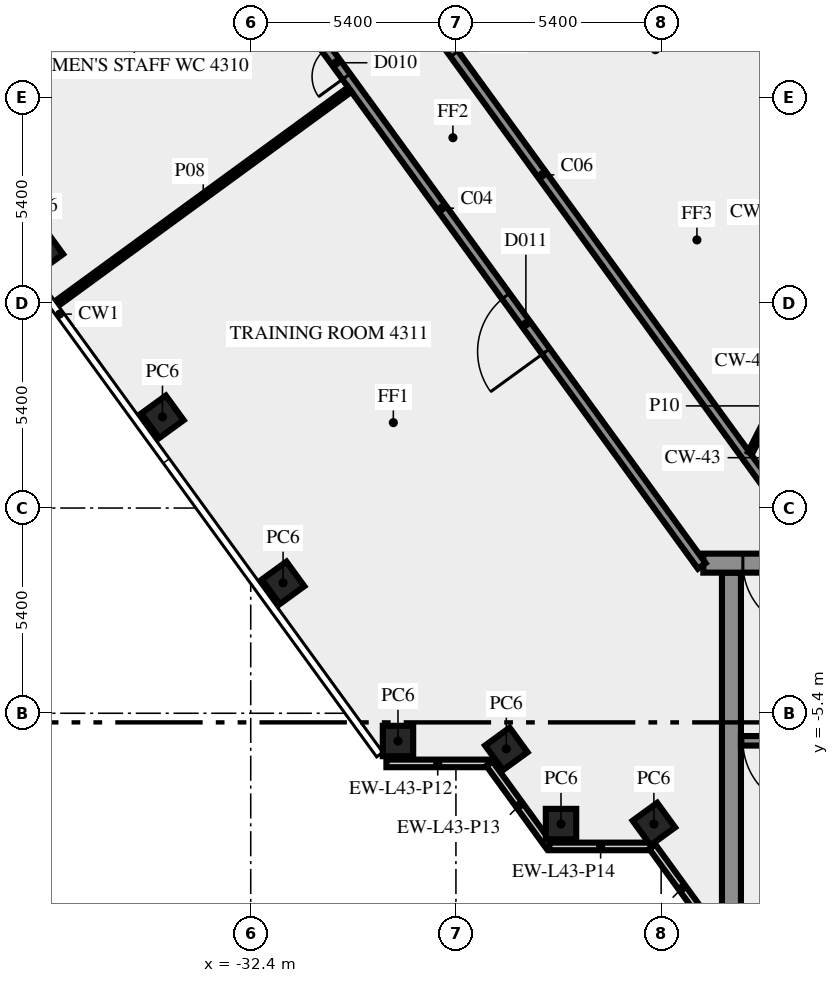
"""IFC4 building model, lengths in metres.
Left out: names, types, materials, properties, quantities, classifications, styles, units other than length and angle.
Written with IfcOpenShell. Run it as: python <this file> out.ifc"""

import sys

from ifc_helpers import new_model, si_unit, direction, frame, frame_2d, origin, origin_2d, place, context, subcontext, project, spatial, rectangle, extrude, element, fill, save


model = new_model("IFC4")
c1 = context("Model", 3, precision=1e-05, world=origin(), true_north=direction((0.0, 1.0)))
c2 = subcontext(c1, "Body", "Model", "MODEL_VIEW")
j1 = project(units=[si_unit("LENGTHUNIT", "METRE"), si_unit("PLANEANGLEUNIT", "RADIAN")], contexts=[c1])
p1 = place(None, origin())
s1 = spatial("IfcSite", under=j1, at=p1, CompositionType="ELEMENT")
p2 = place(p1, origin())
s2 = spatial("IfcBuilding", under=s1, at=p2, CompositionType="ELEMENT")
p3 = place(p2, frame((0.0, 0.0, 184.0)))
s3 = spatial("IfcBuildingStorey", under=s2, at=p3, CompositionType="ELEMENT", Elevation=184.0)
for number, where, z_axis, x_axis in (
    (1, (-37.896, 6.769, 0.0), (0.0, 0.0, 1.0), (0.588, -0.809, 0.0)),
    (2, (-34.722, 2.4, 0.0), (0.0, 0.0, 1.0), (0.588, -0.809, 0.0)),
    (3, (-31.548, -1.969, 0.0), (0.0, 0.0, 1.0), (0.588, -0.809, 0.0)),
    (4, (-28.525, -6.13, 0.0), (0.0, 0.0, 1.0), (1.0, 0.0, 0.0)),
    (5, (-25.674, -6.337, 0.0), (0.0, 0.0, 1.0), (0.588, -0.809, 0.0)),
    (6, (-24.235, -8.315, 0.0), (0.0, 0.0, 1.0), (1.0, 0.0, 0.0)),
    (7, (-21.792, -8.315, 0.0), (0.0, 0.0, 1.0), (0.588, -0.809, 0.0)),
):
    element("IfcColumn", number, at=place(p3, frame(where, z_axis=z_axis, x_axis=x_axis)), inside=s3, PredefinedType="COLUMN", context=c2, shape_type="SweptSolid", body=[
        extrude(rectangle(XDim=0.8, YDim=0.8, at=origin_2d()), origin(), (0.0, 0.0, 1.0), 3.4),
    ])
p4 = place(p3, frame((-28.83, -6.719, 0.0), z_axis=(0.0, 0.0, 1.0), x_axis=(1.0, 0.0, 0.0)))
e8 = element("IfcWall", 8, at=p4, inside=s3, PredefinedType="SOLIDWALL", context=c2, shape_type="SweptSolid", body=[
    extrude(rectangle(XDim=2.7, YDim=0.2, at=frame_2d((1.35, 0.0))), origin(), (0.0, 0.0, 1.0), 3.4),
])
p5 = place(p3, frame((-26.12, -6.724, 0.0), z_axis=(0.0, 0.0, 1.0), x_axis=(0.587720002413, -0.809064397168, 0.0)))
e9 = element("IfcWall", 9, at=p5, inside=s3, PredefinedType="SOLIDWALL", context=c2, shape_type="SweptSolid", body=[
    extrude(rectangle(XDim=2.7, YDim=0.2, at=frame_2d((1.35, 0.0))), origin(), (0.0, 0.0, 1.0), 3.4),
])
p6 = place(p3, frame((-24.543, -8.904, 0.0), z_axis=(0.0, 0.0, 1.0), x_axis=(1.0, 0.0, 0.0)))
e10 = element("IfcWall", 10, at=p6, inside=s3, PredefinedType="SOLIDWALL", context=c2, shape_type="SweptSolid", body=[
    extrude(rectangle(XDim=2.7, YDim=0.2, at=frame_2d((1.35, 0.0))), origin(), (0.0, 0.0, 1.0), 3.4),
])
p7 = place(p3, frame((-21.833, -8.909, 0.0), z_axis=(0.0, 0.0, 1.0), x_axis=(0.587766567315, -0.809030569476, 0.0)))
e11 = element("IfcWall", 11, at=p7, inside=s3, PredefinedType="SOLIDWALL", context=c2, shape_type="SweptSolid", body=[
    extrude(rectangle(XDim=2.688, YDim=0.2, at=frame_2d((1.344, 0.0))), origin(), (0.0, 0.0, 1.0), 3.4),
])
p8 = place(p3, frame((-19.75, -10.5, 0.0), z_axis=(0.0, 0.0, 1.0), x_axis=(0.0, 1.0, 0.0)))
e12 = element("IfcWall", 12, at=p8, inside=s3, PredefinedType="SHEAR", context=c2, shape_type="SweptSolid", body=[
    extrude(rectangle(XDim=8.8, YDim=0.5, at=frame_2d((4.4, 0.0))), origin(), (0.0, 0.0, 1.0), 3.4),
])
p9 = place(p3, frame((-11.45, -6.125, 0.0), z_axis=(0.0, 0.0, 1.0), x_axis=(-1.0, 0.0, 0.0)))
e13 = element("IfcWall", 13, at=p9, inside=s3, PredefinedType="SHEAR", context=c2, shape_type="SweptSolid", body=[
    extrude(rectangle(XDim=8.05, YDim=0.25, at=frame_2d((4.025, 0.0))), origin(), (0.0, 0.0, 1.0), 3.4),
])
p10 = place(p9, frame((6.2, 0.0, 0.0)))
e14 = element("IfcOpeningElement", 14, at=p10, cuts=e13, PredefinedType="OPENING", context=c2, shape_type="SweptSolid", body=[
    extrude(rectangle(XDim=1.8, YDim=2.1, at=frame_2d((0.9, 1.05))), frame((0.0, 0.135, 0.0), z_axis=(0.0, -1.0, 0.0), x_axis=(1.0, 0.0, 0.0)), (0.0, 0.0, 1.0), 0.27),
])
p11 = place(p3, frame((20.49, -1.45, 0.0), z_axis=(0.0, 0.0, 1.0), x_axis=(-1.0, 0.0, 0.0)))
e15 = element("IfcWall", 15, at=p11, inside=s3, PredefinedType="SHEAR", context=c2, shape_type="SweptSolid", body=[
    extrude(rectangle(XDim=40.98, YDim=0.5, at=frame_2d((20.49, 0.0))), origin(), (0.0, 0.0, 1.0), 3.4),
])
p12 = place(p11, frame((38.14, 0.0, 0.0)))
e16 = element("IfcOpeningElement", 16, at=p12, cuts=e15, PredefinedType="OPENING", context=c2, shape_type="SweptSolid", body=[
    extrude(rectangle(XDim=1.8, YDim=2.1, at=frame_2d((0.9, 1.05))), frame((0.0, 0.26, 0.0), z_axis=(0.0, -1.0, 0.0), x_axis=(1.0, 0.0, 0.0)), (0.0, 0.0, 1.0), 0.52),
])
p13 = place(p11, frame((35.89, 0.0, 0.0)))
e17 = element("IfcOpeningElement", 17, at=p13, cuts=e15, PredefinedType="OPENING", context=c2, shape_type="SweptSolid", body=[
    extrude(rectangle(XDim=0.9, YDim=2.1, at=frame_2d((0.45, 1.05))), frame((0.0, 0.26, 0.0), z_axis=(0.0, -1.0, 0.0), x_axis=(1.0, 0.0, 0.0)), (0.0, 0.0, 1.0), 0.52),
])
p14 = place(p11, frame((32.94, 0.0, 0.0)))
e18 = element("IfcOpeningElement", 18, at=p14, cuts=e15, PredefinedType="OPENING", context=c2, shape_type="SweptSolid", body=[
    extrude(rectangle(XDim=0.9, YDim=2.1, at=frame_2d((0.45, 1.05))), frame((0.0, 0.26, 0.0), z_axis=(0.0, -1.0, 0.0), x_axis=(1.0, 0.0, 0.0)), (0.0, 0.0, 1.0), 0.52),
])
p15 = place(p11, frame((30.802, 0.0, 0.0)))
e19 = element("IfcOpeningElement", 19, at=p15, cuts=e15, PredefinedType="OPENING", context=c2, shape_type="SweptSolid", body=[
    extrude(rectangle(XDim=0.9, YDim=2.1, at=frame_2d((0.45, 1.05))), frame((0.0, 0.26, 0.0), z_axis=(0.0, -1.0, 0.0), x_axis=(1.0, 0.0, 0.0)), (0.0, 0.0, 1.0), 0.52),
])
p16 = place(p11, frame((29.24, 0.0, 0.0)))
e20 = element("IfcOpeningElement", 20, at=p16, cuts=e15, PredefinedType="OPENING", context=c2, shape_type="SweptSolid", body=[
    extrude(rectangle(XDim=0.9, YDim=2.1, at=frame_2d((0.45, 1.05))), frame((0.0, 0.26, 0.0), z_axis=(0.0, -1.0, 0.0), x_axis=(1.0, 0.0, 0.0)), (0.0, 0.0, 1.0), 0.52),
])
p17 = place(p11, frame((27.39, 0.0, 0.0)))
e21 = element("IfcOpeningElement", 21, at=p17, cuts=e15, PredefinedType="OPENING", context=c2, shape_type="SweptSolid", body=[
    extrude(rectangle(XDim=0.9, YDim=2.1, at=frame_2d((0.45, 1.05))), frame((0.0, 0.26, 0.0), z_axis=(0.0, -1.0, 0.0), x_axis=(1.0, 0.0, 0.0)), (0.0, 0.0, 1.0), 0.52),
])
p18 = place(p11, frame((25.228, 0.0, 0.0)))
e22 = element("IfcOpeningElement", 22, at=p18, cuts=e15, PredefinedType="OPENING", context=c2, shape_type="SweptSolid", body=[
    extrude(rectangle(XDim=0.9, YDim=2.1, at=frame_2d((0.45, 1.05))), frame((0.0, 0.26, 0.0), z_axis=(0.0, -1.0, 0.0), x_axis=(1.0, 0.0, 0.0)), (0.0, 0.0, 1.0), 0.52),
])
p19 = place(p11, frame((19.59, 0.0, 0.0)))
e23 = element("IfcOpeningElement", 23, at=p19, cuts=e15, PredefinedType="OPENING", context=c2, shape_type="SweptSolid", body=[
    extrude(rectangle(XDim=2.0, YDim=2.1, at=frame_2d((1.0, 1.05))), frame((0.0, 0.26, 0.0), z_axis=(0.0, -1.0, 0.0), x_axis=(1.0, 0.0, 0.0)), (0.0, 0.0, 1.0), 0.52),
])
p20 = place(p11, frame((7.14, 0.0, 0.0)))
e24 = element("IfcOpeningElement", 24, at=p20, cuts=e15, PredefinedType="OPENING", context=c2, shape_type="SweptSolid", body=[
    extrude(rectangle(XDim=0.9, YDim=2.1, at=frame_2d((0.45, 1.05))), frame((0.0, 0.26, 0.0), z_axis=(0.0, -1.0, 0.0), x_axis=(1.0, 0.0, 0.0)), (0.0, 0.0, 1.0), 0.52),
])
p21 = place(p11, frame((5.028, 0.0, 0.0)))
e25 = element("IfcOpeningElement", 25, at=p21, cuts=e15, PredefinedType="OPENING", context=c2, shape_type="SweptSolid", body=[
    extrude(rectangle(XDim=0.8, YDim=2.1, at=frame_2d((0.4, 1.05))), frame((0.0, 0.26, 0.0), z_axis=(0.0, -1.0, 0.0), x_axis=(1.0, 0.0, 0.0)), (0.0, 0.0, 1.0), 0.52),
])
p22 = place(p11, frame((3.452, 0.0, 0.0)))
e26 = element("IfcOpeningElement", 26, at=p22, cuts=e15, PredefinedType="OPENING", context=c2, shape_type="SweptSolid", body=[
    extrude(rectangle(XDim=0.8, YDim=2.1, at=frame_2d((0.4, 1.05))), frame((0.0, 0.26, 0.0), z_axis=(0.0, -1.0, 0.0), x_axis=(1.0, 0.0, 0.0)), (0.0, 0.0, 1.0), 0.52),
])
p23 = place(p11, frame((1.04, 0.0, 0.0)))
e27 = element("IfcOpeningElement", 27, at=p23, cuts=e15, PredefinedType="OPENING", context=c2, shape_type="SweptSolid", body=[
    extrude(rectangle(XDim=1.8, YDim=2.1, at=frame_2d((0.9, 1.05))), frame((0.0, 0.26, 0.0), z_axis=(0.0, -1.0, 0.0), x_axis=(1.0, 0.0, 0.0)), (0.0, 0.0, 1.0), 0.52),
])
p24 = place(p3, frame((-20.531, -1.523, 0.0), z_axis=(0.0, 0.0, 1.0), x_axis=(-0.587784239999, 0.809017729849, 0.0)))
e28 = element("IfcWall", 28, at=p24, inside=s3, PredefinedType="SOLIDWALL", context=c2, shape_type="SweptSolid", body=[
    extrude(rectangle(XDim=23.271, YDim=0.25, at=frame_2d((11.635, 0.0))), origin(), (0.0, 0.0, 1.0), 3.4),
])
p25 = place(p24, frame((15.916, 0.0, 0.0)))
e29 = element("IfcOpeningElement", 29, at=p25, cuts=e28, PredefinedType="OPENING", context=c2, shape_type="SweptSolid", body=[
    extrude(rectangle(XDim=0.9, YDim=2.1, at=frame_2d((0.45, 1.05))), frame((0.0, 0.135, 0.0), z_axis=(0.0, -1.0, 0.0), x_axis=(1.0, 0.0, 0.0)), (0.0, 0.0, 1.0), 0.27),
])
p26 = place(p24, frame((6.974, 0.0, 0.0)))
e30 = element("IfcOpeningElement", 30, at=p26, cuts=e28, PredefinedType="OPENING", context=c2, shape_type="SweptSolid", body=[
    extrude(rectangle(XDim=1.8, YDim=2.1, at=frame_2d((0.9, 1.05))), frame((0.0, 0.135, 0.0), z_axis=(0.0, -1.0, 0.0), x_axis=(1.0, 0.0, 0.0)), (0.0, 0.0, 1.0), 0.27),
])
p27 = place(p3, frame((-31.918, 18.658, 0.0), z_axis=(0.0, 0.0, 1.0), x_axis=(0.587788731405, -0.80901446664, 0.0)))
e31 = element("IfcWall", 31, at=p27, inside=s3, PredefinedType="SOLIDWALL", context=c2, shape_type="SweptSolid", body=[
    extrude(rectangle(XDim=24.453, YDim=0.25, at=frame_2d((12.227, 0.0))), origin(), (0.0, 0.0, 1.0), 3.4),
])
p28 = place(p27, frame((0.224, 0.0, 0.0)))
e32 = element("IfcOpeningElement", 32, at=p28, cuts=e31, PredefinedType="OPENING", context=c2, shape_type="SweptSolid", body=[
    extrude(rectangle(XDim=0.9, YDim=2.1, at=frame_2d((0.45, 1.05))), frame((0.0, 0.135, 0.0), z_axis=(0.0, -1.0, 0.0), x_axis=(1.0, 0.0, 0.0)), (0.0, 0.0, 1.0), 0.27),
])
p29 = place(p27, frame((7.395, 0.0, 0.0)))
e33 = element("IfcOpeningElement", 33, at=p29, cuts=e31, PredefinedType="OPENING", context=c2, shape_type="SweptSolid", body=[
    extrude(rectangle(XDim=0.9, YDim=2.1, at=frame_2d((0.45, 1.05))), frame((0.0, 0.135, 0.0), z_axis=(0.0, -1.0, 0.0), x_axis=(1.0, 0.0, 0.0)), (0.0, 0.0, 1.0), 0.27),
])
p30 = place(p3, frame((-42.036, 11.615, 0.0), z_axis=(0.0, 0.0, 1.0), x_axis=(0.808985331811, 0.587828829605, 0.0)))
e34 = element("IfcWall", 34, at=p30, inside=s3, PredefinedType="PARTITIONING", context=c2, shape_type="SweptSolid", body=[
    extrude(rectangle(XDim=9.57, YDim=0.12, at=frame_2d((4.785, 0.0))), origin(), (0.0, 0.0, 1.0), 2.6),
])
p31 = place(p3, frame((-37.506, 5.381, 0.0), z_axis=(0.0, 0.0, 1.0), x_axis=(0.807645841498, 0.589667868135, 0.0)))
e35 = element("IfcWall", 35, at=p31, inside=s3, PredefinedType="PARTITIONING", context=c2, shape_type="SweptSolid", body=[
    extrude(rectangle(XDim=9.551, YDim=0.15, at=frame_2d((4.775, 0.0))), origin(), (0.0, 0.0, 1.0), 2.6),
])
p32 = place(p3, frame((-19.261, 1.45, 0.0), z_axis=(0.0, 0.0, 1.0), x_axis=(0.453950796792, 0.891026752736, 0.0)))
e36 = element("IfcWall", 36, at=p32, inside=s3, PredefinedType="PARTITIONING", context=c2, shape_type="SweptSolid", body=[
    extrude(rectangle(XDim=2.778, YDim=0.12, at=frame_2d((1.389, 0.0))), origin(), (0.0, 0.0, 1.0), 3.4),
])
p33 = place(p10, origin())
e37 = element("IfcDoor", 37, at=p33, inside=s3, OperationType="DOUBLE_DOOR_SINGLE_SWING", PredefinedType="DOOR", context=c2, shape_type="SweptSolid", body=[
    extrude(rectangle(XDim=1.8, YDim=2.1, at=frame_2d((0.9, 1.05))), frame((0.0, 0.025, 0.0), z_axis=(0.0, -1.0, 0.0), x_axis=(1.0, 0.0, 0.0)), (0.0, 0.0, 1.0), 0.05),
])
fill(e14, e37)
p34 = place(p12, origin())
e38 = element("IfcDoor", 38, at=p34, inside=s3, OperationType="DOUBLE_DOOR_SINGLE_SWING", PredefinedType="DOOR", context=c2, shape_type="SweptSolid", body=[
    extrude(rectangle(XDim=1.8, YDim=2.1, at=frame_2d((0.9, 1.05))), frame((0.0, 0.025, 0.0), z_axis=(0.0, -1.0, 0.0), x_axis=(1.0, 0.0, 0.0)), (0.0, 0.0, 1.0), 0.05),
])
fill(e16, e38)
p35 = place(p29, origin())
e39 = element("IfcDoor", 39, at=p35, inside=s3, OperationType="SINGLE_SWING_LEFT", PredefinedType="DOOR", context=c2, shape_type="SweptSolid", body=[
    extrude(rectangle(XDim=0.9, YDim=2.1, at=frame_2d((0.45, 1.05))), frame((0.0, 0.025, 0.0), z_axis=(0.0, -1.0, 0.0), x_axis=(1.0, 0.0, 0.0)), (0.0, 0.0, 1.0), 0.05),
])
fill(e33, e39)
p36 = place(p25, origin())
e40 = element("IfcDoor", 40, at=p36, inside=s3, OperationType="SINGLE_SWING_LEFT", PredefinedType="DOOR", context=c2, shape_type="SweptSolid", body=[
    extrude(rectangle(XDim=0.9, YDim=2.1, at=frame_2d((0.45, 1.05))), frame((0.0, 0.025, 0.0), z_axis=(0.0, -1.0, 0.0), x_axis=(1.0, 0.0, 0.0)), (0.0, 0.0, 1.0), 0.05),
])
fill(e29, e40)
p37 = place(p26, origin())
e41 = element("IfcDoor", 41, at=p37, inside=s3, OperationType="DOUBLE_DOOR_SINGLE_SWING", PredefinedType="DOOR", context=c2, shape_type="SweptSolid", body=[
    extrude(rectangle(XDim=1.8, YDim=2.1, at=frame_2d((0.9, 1.05))), frame((0.0, 0.025, 0.0), z_axis=(0.0, -1.0, 0.0), x_axis=(1.0, 0.0, 0.0)), (0.0, 0.0, 1.0), 0.05),
])
fill(e30, e41)
save(model, sys.argv[1])
